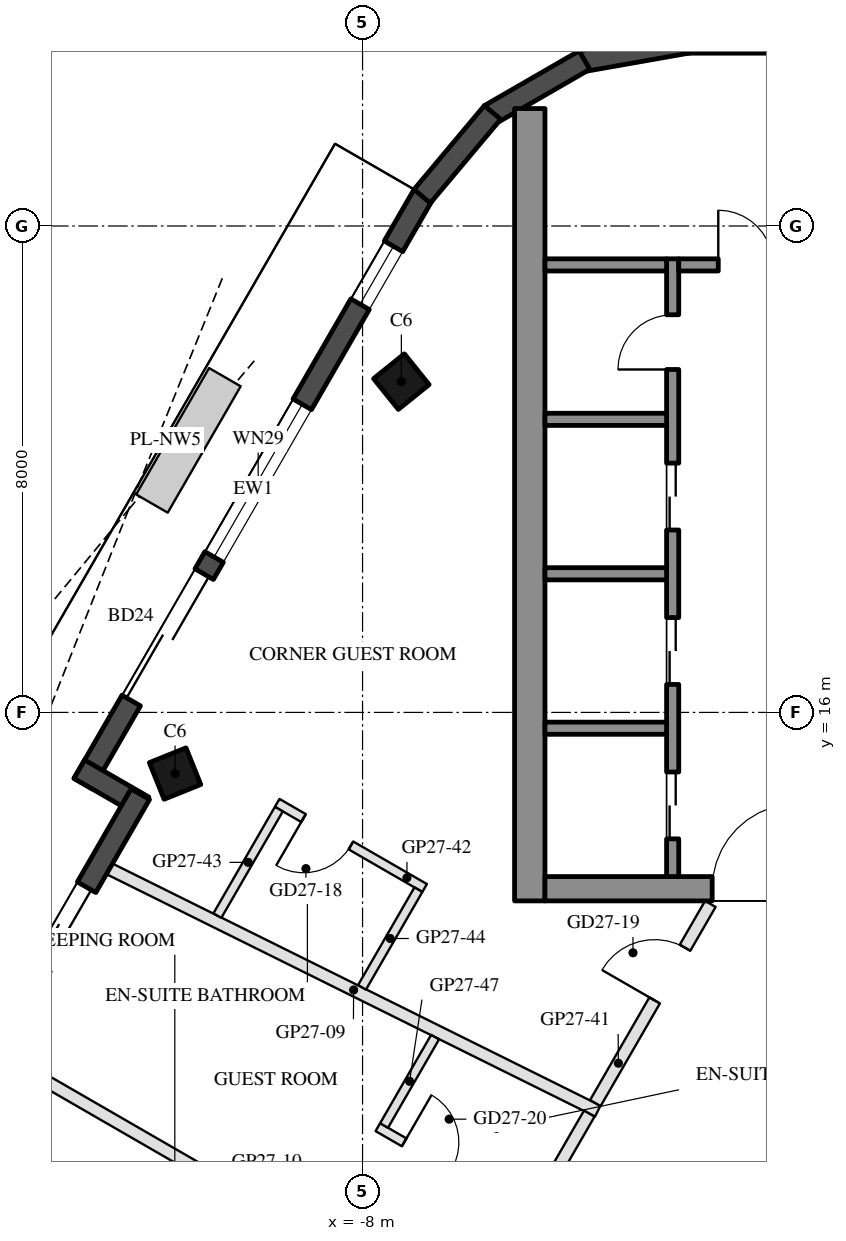
"""IFC4 building model, lengths in metres.
Left out: names, types, materials, properties, quantities, classifications, styles, units other than length and angle.
Written with IfcOpenShell. Run it as: python <this file> out.ifc"""

import sys

from ifc_helpers import new_model, si_unit, direction, frame, frame_2d, origin, origin_2d, place, context, subcontext, project, spatial, rectangle, hollow_rectangle, extrude, boolean, halfspace, element, fill, save


model = new_model("IFC4")
c1 = context("Model", 3, precision=1e-05, world=origin(), true_north=direction((0.0, 1.0)))
c2 = subcontext(c1, "Body", "Model", "MODEL_VIEW")
j1 = project(units=[si_unit("LENGTHUNIT", "METRE"), si_unit("PLANEANGLEUNIT", "RADIAN")], contexts=[c1])
p1 = place(None, origin())
s1 = spatial("IfcSite", under=j1, at=p1, CompositionType="ELEMENT")
p2 = place(p1, origin())
s2 = spatial("IfcBuilding", under=s1, at=p2, CompositionType="ELEMENT")
p3 = place(p2, frame((0.0, 0.0, 276.3)))
s3 = spatial("IfcBuildingStorey", under=s2, at=p3, CompositionType="ELEMENT", Elevation=276.3)
p4 = place(p3, frame((-7.362, 21.44, 0.0), z_axis=(0.06966478086, -0.179988931962, 0.981198656073), x_axis=(0.504437272402, 0.854926536661, 0.121010971086)))
e1 = element("IfcColumn", 1, at=p4, inside=s3, PredefinedType="COLUMN", context=c2, shape_type="SweptSolid", body=[
    boolean("DIFFERENCE", boolean("DIFFERENCE", extrude(hollow_rectangle(XDim=0.65, YDim=0.65, WallThickness=0.03, at=origin_2d()), origin(), (0.0, 0.0, 1.0), 3.771), halfspace(frame((0.0, 0.0, 0.047), z_axis=(0.0, 0.0, 1.0), x_axis=(1.0, 0.0, 0.0)), True)), halfspace(frame((0.0, 0.0, 3.724), z_axis=(0.0, 0.0, 1.0), x_axis=(1.0, 0.0, 0.0)), False)),
])
p5 = place(p3, frame((-11.083, 14.994, 0.0), z_axis=(0.100518021011, -0.128316722417, 0.98662604172), x_axis=(0.503129383785, 0.862065632243, 0.060857775822)))
e2 = element("IfcColumn", 2, at=p5, inside=s3, PredefinedType="COLUMN", context=c2, shape_type="SweptSolid", body=[
    boolean("DIFFERENCE", boolean("DIFFERENCE", extrude(hollow_rectangle(XDim=0.65, YDim=0.65, WallThickness=0.03, at=origin_2d()), origin(), (0.0, 0.0, 1.0), 3.75), halfspace(frame((0.0, 0.0, 0.04), z_axis=(0.0, 0.0, 1.0), x_axis=(1.0, 0.0, 0.0)), True)), halfspace(frame((0.0, 0.0, 3.71), z_axis=(0.0, 0.0, 1.0), x_axis=(1.0, 0.0, 0.0)), False)),
])
p6 = place(p3, frame((-7.002, 24.514, 0.0), z_axis=(0.0, 0.0, 1.0), x_axis=(-0.500000830309, -0.866024924405, 0.0)))
e3 = element("IfcWall", 3, at=p6, inside=s3, PredefinedType="SOLIDWALL", context=c2, shape_type="SweptSolid", body=[
    extrude(rectangle(XDim=11.185, YDim=0.35, at=frame_2d((5.593, 0.0))), origin(), (0.0, 0.0, 1.0), 3.55),
])
p7 = place(p6, frame((0.979, 0.0, 0.3)))
e4 = element("IfcOpeningElement", 4, at=p7, cuts=e3, PredefinedType="OPENING", context=c2, shape_type="SweptSolid", body=[
    extrude(rectangle(XDim=1.1, YDim=2.65, at=frame_2d((0.55, 1.325))), frame((0.0, 0.185, 0.0), z_axis=(0.0, -1.0, 0.0), x_axis=(1.0, 0.0, 0.0)), (0.0, 0.0, 1.0), 0.37),
])
p8 = place(p6, frame((7.205, 0.0, 0.0)))
e5 = element("IfcOpeningElement", 5, at=p8, cuts=e3, PredefinedType="OPENING", context=c2, shape_type="SweptSolid", body=[
    extrude(rectangle(XDim=2.4, YDim=2.4, at=frame_2d((1.2, 1.2))), frame((0.0, 0.185, 0.0), z_axis=(0.0, -1.0, 0.0), x_axis=(1.0, 0.0, 0.0)), (0.0, 0.0, 1.0), 0.37),
])
p9 = place(p6, frame((3.979, 0.0, 0.3)))
e6 = element("IfcOpeningElement", 6, at=p9, cuts=e3, PredefinedType="OPENING", context=c2, shape_type="SweptSolid", body=[
    extrude(rectangle(XDim=2.9, YDim=2.65, at=frame_2d((1.45, 1.325))), frame((0.0, 0.185, 0.0), z_axis=(0.0, -1.0, 0.0), x_axis=(1.0, 0.0, 0.0)), (0.0, 0.0, 1.0), 0.37),
])
p10 = place(p3, frame((-12.659, 15.066, 0.0), z_axis=(0.0, 0.0, 1.0), x_axis=(0.866005645448, -0.500034220881, 0.0)))
e7 = element("IfcWall", 7, at=p10, inside=s3, PredefinedType="SOLIDWALL", context=c2, shape_type="SweptSolid", body=[
    extrude(rectangle(XDim=1.22, YDim=0.35, at=frame_2d((0.61, 0.0))), origin(), (0.0, 0.0, 1.0), 3.55),
])
p11 = place(p3, frame((-11.655, 14.655, 0.0), z_axis=(0.0, 0.0, 1.0), x_axis=(-0.499995993298, -0.866027717042, 0.0)))
e8 = element("IfcWall", 8, at=p11, inside=s3, PredefinedType="SOLIDWALL", context=c2, shape_type="SweptSolid", body=[
    extrude(rectangle(XDim=6.284, YDim=0.35, at=frame_2d((3.142, 0.0))), origin(), (0.0, 0.0, 1.0), 3.55),
])
p12 = place(p11, frame((1.767, 0.0, 0.0)))
e9 = element("IfcOpeningElement", 9, at=p12, cuts=e8, PredefinedType="OPENING", context=c2, shape_type="SweptSolid", body=[
    extrude(rectangle(XDim=1.5, YDim=2.4, at=frame_2d((0.75, 1.2))), frame((0.0, 0.185, 0.0), z_axis=(0.0, -1.0, 0.0), x_axis=(1.0, 0.0, 0.0)), (0.0, 0.0, 1.0), 0.37),
])
p13 = place(p11, frame((3.566, 0.0, 0.3)))
e10 = element("IfcOpeningElement", 10, at=p13, cuts=e8, PredefinedType="OPENING", context=c2, shape_type="SweptSolid", body=[
    extrude(rectangle(XDim=0.8, YDim=2.65, at=frame_2d((0.4, 1.325))), frame((0.0, 0.185, 0.0), z_axis=(0.0, -1.0, 0.0), x_axis=(1.0, 0.0, 0.0)), (0.0, 0.0, 1.0), 0.37),
])
p14 = place(p3, frame((2.666, 27.018, 0.0), z_axis=(0.0, 0.0, 1.0), x_axis=(-1.0, 0.0, 0.0)))
e11 = element("IfcWall", 11, at=p14, inside=s3, PredefinedType="SOLIDWALL", context=c2, shape_type="SweptSolid", body=[
    extrude(rectangle(XDim=5.331, YDim=0.35, at=frame_2d((2.666, 0.0))), origin(), (0.0, 0.0, 1.0), 3.55),
])
for number, where, z_axis, x_axis in (
    (12, (-2.635, 27.02, 0.0), (0.0, 0.0, 1.0), (-0.985, -0.174, 0.0)),
    (13, (-4.351, 26.729, 0.0), (0.0, 0.0, 1.0), (-0.866, -0.5, 0.0)),
):
    element("IfcWall", number, at=place(p3, frame(where, z_axis=z_axis, x_axis=x_axis)), inside=s3, PredefinedType="SOLIDWALL", context=c2, shape_type="SweptSolid", body=[
        extrude(rectangle(XDim=1.8, YDim=0.35, at=frame_2d((0.9, 0.0))), origin(), (0.0, 0.0, 1.0), 3.55),
    ])
p15 = place(p3, frame((-5.863, 25.868, 0.0), z_axis=(0.0, 0.0, 1.0), x_axis=(-0.642756114672, -0.766070869471, 0.0)))
e14 = element("IfcWall", 14, at=p15, inside=s3, PredefinedType="SOLIDWALL", context=c2, shape_type="SweptSolid", body=[
    extrude(rectangle(XDim=1.8, YDim=0.35, at=frame_2d((0.9, 0.0))), origin(), (0.0, 0.0, 1.0), 3.55),
])
p16 = place(p3, frame((-5.25, 12.9, 0.0), z_axis=(0.0, 0.0, 1.0), x_axis=(0.0, 1.0, 0.0)))
e15 = element("IfcWall", 15, at=p16, inside=s3, PredefinedType="SHEAR", context=c2, shape_type="SweptSolid", body=[
    extrude(rectangle(XDim=13.031, YDim=0.5, at=frame_2d((6.516, 0.0))), origin(), (0.0, 0.0, 1.0), 3.5),
])
p17 = place(p3, frame((5.0, 13.1, 0.0), z_axis=(0.0, 0.0, 1.0), x_axis=(-1.0, 0.0, 0.0)))
e16 = element("IfcWall", 16, at=p17, inside=s3, PredefinedType="SHEAR", context=c2, shape_type="SweptSolid", body=[
    extrude(rectangle(XDim=10.0, YDim=0.4, at=frame_2d((5.0, 0.0))), origin(), (0.0, 0.0, 1.0), 3.5),
])
p18 = place(p17, frame((3.55, 0.0, 0.0)))
e17 = element("IfcOpeningElement", 17, at=p18, cuts=e16, PredefinedType="OPENING", context=c2, shape_type="SweptSolid", body=[
    extrude(rectangle(XDim=1.1, YDim=2.1, at=frame_2d((0.55, 1.05))), frame((0.0, 0.21, 0.0), z_axis=(0.0, -1.0, 0.0), x_axis=(1.0, 0.0, 0.0)), (0.0, 0.0, 1.0), 0.42),
])
p19 = place(p17, frame((5.85, 0.0, 0.0)))
e18 = element("IfcOpeningElement", 18, at=p19, cuts=e16, PredefinedType="OPENING", context=c2, shape_type="SweptSolid", body=[
    extrude(rectangle(XDim=1.4, YDim=2.1, at=frame_2d((0.7, 1.05))), frame((0.0, 0.21, 0.0), z_axis=(0.0, -1.0, 0.0), x_axis=(1.0, 0.0, 0.0)), (0.0, 0.0, 1.0), 0.42),
])
p20 = place(p3, frame((-2.9, 13.3, 0.0), z_axis=(0.0, 0.0, 1.0), x_axis=(0.0, 1.0, 0.0)))
e19 = element("IfcWall", 19, at=p20, inside=s3, PredefinedType="SHEAR", context=c2, shape_type="SweptSolid", body=[
    extrude(rectangle(XDim=10.16, YDim=0.2, at=frame_2d((5.08, 0.0))), origin(), (0.0, 0.0, 1.0), 3.5),
])
p21 = place(p20, frame((0.62, 0.0, 0.0)))
e20 = element("IfcOpeningElement", 20, at=p21, cuts=e19, PredefinedType="OPENING", context=c2, shape_type="SweptSolid", body=[
    extrude(rectangle(XDim=1.1, YDim=2.1, at=frame_2d((0.55, 1.05))), frame((0.0, 0.11, 0.0), z_axis=(0.0, -1.0, 0.0), x_axis=(1.0, 0.0, 0.0)), (0.0, 0.0, 1.0), 0.22),
])
p22 = place(p20, frame((3.16, 0.0, 0.0)))
e21 = element("IfcOpeningElement", 21, at=p22, cuts=e19, PredefinedType="OPENING", context=c2, shape_type="SweptSolid", body=[
    extrude(rectangle(XDim=1.1, YDim=2.1, at=frame_2d((0.55, 1.05))), frame((0.0, 0.11, 0.0), z_axis=(0.0, -1.0, 0.0), x_axis=(1.0, 0.0, 0.0)), (0.0, 0.0, 1.0), 0.22),
])
p23 = place(p20, frame((5.7, 0.0, 0.0)))
e22 = element("IfcOpeningElement", 22, at=p23, cuts=e19, PredefinedType="OPENING", context=c2, shape_type="SweptSolid", body=[
    extrude(rectangle(XDim=1.1, YDim=2.1, at=frame_2d((0.55, 1.05))), frame((0.0, 0.11, 0.0), z_axis=(0.0, -1.0, 0.0), x_axis=(1.0, 0.0, 0.0)), (0.0, 0.0, 1.0), 0.22),
])
p24 = place(p20, frame((8.34, 0.0, 0.0)))
e23 = element("IfcOpeningElement", 23, at=p24, cuts=e19, PredefinedType="OPENING", context=c2, shape_type="SweptSolid", body=[
    extrude(rectangle(XDim=0.9, YDim=2.1, at=frame_2d((0.45, 1.05))), frame((0.0, 0.11, 0.0), z_axis=(0.0, -1.0, 0.0), x_axis=(1.0, 0.0, 0.0)), (0.0, 0.0, 1.0), 0.22),
])
p25 = place(p3, frame((-0.4, 23.36, 0.0), z_axis=(0.0, 0.0, 1.0), x_axis=(-1.0, 0.0, 0.0)))
e24 = element("IfcWall", 24, at=p25, inside=s3, PredefinedType="SHEAR", context=c2, shape_type="SweptSolid", body=[
    extrude(rectangle(XDim=2.4, YDim=0.2, at=frame_2d((1.2, 0.0))), origin(), (0.0, 0.0, 1.0), 3.5),
])
p26 = place(p25, frame((0.85, 0.0, 0.0)))
e25 = element("IfcOpeningElement", 25, at=p26, cuts=e24, PredefinedType="OPENING", context=c2, shape_type="SweptSolid", body=[
    extrude(rectangle(XDim=0.9, YDim=2.1, at=frame_2d((0.45, 1.05))), frame((0.0, 0.11, 0.0), z_axis=(0.0, -1.0, 0.0), x_axis=(1.0, 0.0, 0.0)), (0.0, 0.0, 1.0), 0.22),
])
for number, where, z_axis, x_axis in (
    (26, (-3.0, 15.74, 0.0), (0.0, 0.0, 1.0), (-1.0, 0.0, 0.0)),
    (27, (-3.0, 18.28, 0.0), (0.0, 0.0, 1.0), (-1.0, 0.0, 0.0)),
    (28, (-3.0, 20.82, 0.0), (0.0, 0.0, 1.0), (-1.0, 0.0, 0.0)),
    (29, (-3.0, 23.36, 0.0), (0.0, 0.0, 1.0), (-1.0, 0.0, 0.0)),
):
    element("IfcWall", number, at=place(p3, frame(where, z_axis=z_axis, x_axis=x_axis)), inside=s3, PredefinedType="SHEAR", context=c2, shape_type="SweptSolid", body=[
        extrude(rectangle(XDim=2.0, YDim=0.2, at=frame_2d((1.0, 0.0))), origin(), (0.0, 0.0, 1.0), 3.5),
    ])
p27 = place(p3, frame((-12.162, 13.427, 0.0), z_axis=(0.0, 0.0, 1.0), x_axis=(0.895849808174, -0.444356974959, 0.0)))
e30 = element("IfcWall", 30, at=p27, inside=s3, PredefinedType="PARTITIONING", context=c2, shape_type="SweptSolid", body=[
    extrude(rectangle(XDim=8.964, YDim=0.2, at=frame_2d((4.482, 0.0))), origin(), (0.0, 0.0, 1.0), 3.1),
])
p28 = place(p3, frame((-13.935, 10.355, 0.0), z_axis=(0.0, 0.0, 1.0), x_axis=(0.866026066645, -0.499998851889, 0.0)))
e31 = element("IfcWall", 31, at=p28, inside=s3, PredefinedType="PARTITIONING", context=c2, shape_type="SweptSolid", body=[
    extrude(rectangle(XDim=8.946, YDim=0.2, at=frame_2d((4.473, 0.0))), origin(), (0.0, 0.0, 1.0), 3.1),
])
p29 = place(p3, frame((-4.171, 9.575, 0.0), z_axis=(0.0, 0.0, 1.0), x_axis=(0.49999255039, 0.866029704776, 0.0)))
e32 = element("IfcWall", 32, at=p29, inside=s3, PredefinedType="PARTITIONING", context=c2, shape_type="SweptSolid", body=[
    extrude(rectangle(XDim=3.782, YDim=0.2, at=frame_2d((1.891, 0.0))), origin(), (0.0, 0.0, 1.0), 3.05),
])
p30 = place(p29, frame((1.95, 0.0, 0.0)))
e33 = element("IfcOpeningElement", 33, at=p30, cuts=e32, PredefinedType="OPENING", context=c2, shape_type="SweptSolid", body=[
    extrude(rectangle(XDim=1.0, YDim=2.1, at=frame_2d((0.5, 1.05))), frame((0.0, 0.11, 0.0), z_axis=(0.0, -1.0, 0.0), x_axis=(1.0, 0.0, 0.0)), (0.0, 0.0, 1.0), 0.22),
])
p31 = place(p3, frame((-6.979, 13.112, 0.0), z_axis=(0.0, 0.0, 1.0), x_axis=(-0.865996816683, 0.500049511043, 0.0)))
e34 = element("IfcWall", 34, at=p31, inside=s3, PredefinedType="PARTITIONING", context=c2, shape_type="SweptSolid", body=[
    extrude(rectangle(XDim=2.8, YDim=0.15, at=frame_2d((1.4, 0.0))), origin(), (0.0, 0.0, 1.0), 3.55),
])
p32 = place(p31, frame((1.4, 0.0, 0.0)))
e35 = element("IfcOpeningElement", 35, at=p32, cuts=e34, PredefinedType="OPENING", context=c2, shape_type="SweptSolid", body=[
    extrude(rectangle(XDim=0.9, YDim=2.1, at=frame_2d((0.45, 1.05))), frame((0.0, 0.085, 0.0), z_axis=(0.0, -1.0, 0.0), x_axis=(1.0, 0.0, 0.0)), (0.0, 0.0, 1.0), 0.17),
])
p33 = place(p3, frame((-9.376, 14.41, 0.0), z_axis=(0.0, 0.0, 1.0), x_axis=(-0.499917528438, -0.866073013527, 0.0)))
e36 = element("IfcWall", 36, at=p33, inside=s3, PredefinedType="PARTITIONING", context=c2, shape_type="SweptSolid", body=[
    extrude(rectangle(XDim=2.022, YDim=0.15, at=frame_2d((1.011, 0.0))), origin(), (0.0, 0.0, 1.0), 3.05),
])
p34 = place(p3, frame((-7.081, 13.085, 0.0), z_axis=(0.0, 0.0, 1.0), x_axis=(-0.500060473882, -0.865990486357, 0.0)))
e37 = element("IfcWall", 37, at=p34, inside=s3, PredefinedType="PARTITIONING", context=c2, shape_type="SweptSolid", body=[
    extrude(rectangle(XDim=1.855, YDim=0.15, at=frame_2d((0.927, 0.0))), origin(), (0.0, 0.0, 1.0), 3.05),
])
p35 = place(p3, frame((-6.225, 6.019, 0.0), z_axis=(0.0, 0.0, 1.0), x_axis=(0.500011000363, 0.866019052629, 0.0)))
e38 = element("IfcWall", 38, at=p35, inside=s3, PredefinedType="PARTITIONING", context=c2, shape_type="SweptSolid", body=[
    extrude(rectangle(XDim=3.906, YDim=0.2, at=frame_2d((1.953, 0.0))), origin(), (0.0, 0.0, 1.0), 3.05),
])
p36 = place(p35, frame((0.45, 0.0, 0.0)))
e39 = element("IfcOpeningElement", 39, at=p36, cuts=e38, PredefinedType="OPENING", context=c2, shape_type="SweptSolid", body=[
    extrude(rectangle(XDim=1.0, YDim=2.1, at=frame_2d((0.5, 1.05))), frame((0.0, 0.11, 0.0), z_axis=(0.0, -1.0, 0.0), x_axis=(1.0, 0.0, 0.0)), (0.0, 0.0, 1.0), 0.22),
])
p37 = place(p3, frame((-7.749, 9.179, 0.0), z_axis=(0.0, 0.0, 1.0), x_axis=(0.866018616679, -0.500011755427, 0.0)))
e40 = element("IfcWall", 40, at=p37, inside=s3, PredefinedType="PARTITIONING", context=c2, shape_type="SweptSolid", body=[
    extrude(rectangle(XDim=2.8, YDim=0.15, at=frame_2d((1.4, 0.0))), origin(), (0.0, 0.0, 1.0), 3.55),
])
p38 = place(p37, frame((0.5, 0.0, 0.0)))
e41 = element("IfcOpeningElement", 41, at=p38, cuts=e40, PredefinedType="OPENING", context=c2, shape_type="SweptSolid", body=[
    extrude(rectangle(XDim=0.9, YDim=2.1, at=frame_2d((0.45, 1.05))), frame((0.0, 0.085, 0.0), z_axis=(0.0, -1.0, 0.0), x_axis=(1.0, 0.0, 0.0)), (0.0, 0.0, 1.0), 0.17),
])
p39 = place(p3, frame((-6.807, 10.659, 0.0), z_axis=(0.0, 0.0, 1.0), x_axis=(-0.500020578564, -0.866013522419, 0.0)))
e42 = element("IfcWall", 42, at=p39, inside=s3, PredefinedType="PARTITIONING", context=c2, shape_type="SweptSolid", body=[
    extrude(rectangle(XDim=1.678, YDim=0.15, at=frame_2d((0.839, 0.0))), origin(), (0.0, 0.0, 1.0), 3.55),
])
p40 = place(p7, origin())
e43 = element("IfcWindow", 43, at=p40, inside=s3, PartitioningType="SINGLE_PANEL", PredefinedType="WINDOW", context=c2, shape_type="SweptSolid", body=[
    extrude(rectangle(XDim=1.1, YDim=2.65, at=frame_2d((0.55, 1.325))), frame((0.0, 0.03, 0.0), z_axis=(0.0, -1.0, 0.0), x_axis=(1.0, 0.0, 0.0)), (0.0, 0.0, 1.0), 0.06),
])
fill(e4, e43)
p41 = place(p8, frame((2.4, 0.0, 0.0), z_axis=(0.0, 0.0, 1.0), x_axis=(-1.0, 0.0, 0.0)))
e44 = element("IfcDoor", 44, at=p41, inside=s3, OperationType="SLIDING_TO_LEFT", PredefinedType="DOOR", context=c2, shape_type="SweptSolid", body=[
    extrude(rectangle(XDim=2.4, YDim=2.4, at=frame_2d((1.2, 1.2))), frame((0.0, 0.025, 0.0), z_axis=(0.0, -1.0, 0.0), x_axis=(1.0, 0.0, 0.0)), (0.0, 0.0, 1.0), 0.05),
])
fill(e5, e44)
p42 = place(p9, origin())
e45 = element("IfcWindow", 45, at=p42, inside=s3, PartitioningType="SINGLE_PANEL", PredefinedType="WINDOW", context=c2, shape_type="SweptSolid", body=[
    extrude(rectangle(XDim=2.9, YDim=2.65, at=frame_2d((1.45, 1.325))), frame((0.0, 0.03, 0.0), z_axis=(0.0, -1.0, 0.0), x_axis=(1.0, 0.0, 0.0)), (0.0, 0.0, 1.0), 0.06),
])
fill(e6, e45)
p43 = place(p12, frame((1.5, 0.0, 0.0), z_axis=(0.0, 0.0, 1.0), x_axis=(-1.0, 0.0, 0.0)))
e46 = element("IfcDoor", 46, at=p43, inside=s3, OperationType="SLIDING_TO_LEFT", PredefinedType="DOOR", context=c2, shape_type="SweptSolid", body=[
    extrude(rectangle(XDim=1.5, YDim=2.4, at=frame_2d((0.75, 1.2))), frame((0.0, 0.025, 0.0), z_axis=(0.0, -1.0, 0.0), x_axis=(1.0, 0.0, 0.0)), (0.0, 0.0, 1.0), 0.05),
])
fill(e9, e46)
p44 = place(p21, origin())
e47 = element("IfcDoor", 47, at=p44, inside=s3, OperationType="DOUBLE_DOOR_SLIDING", PredefinedType="DOOR", context=c2, shape_type="SweptSolid", body=[
    extrude(rectangle(XDim=1.1, YDim=2.1, at=frame_2d((0.55, 1.05))), frame((0.0, 0.025, 0.0), z_axis=(0.0, -1.0, 0.0), x_axis=(1.0, 0.0, 0.0)), (0.0, 0.0, 1.0), 0.05),
])
fill(e20, e47)
p45 = place(p22, origin())
e48 = element("IfcDoor", 48, at=p45, inside=s3, OperationType="DOUBLE_DOOR_SLIDING", PredefinedType="DOOR", context=c2, shape_type="SweptSolid", body=[
    extrude(rectangle(XDim=1.1, YDim=2.1, at=frame_2d((0.55, 1.05))), frame((0.0, 0.025, 0.0), z_axis=(0.0, -1.0, 0.0), x_axis=(1.0, 0.0, 0.0)), (0.0, 0.0, 1.0), 0.05),
])
fill(e21, e48)
p46 = place(p23, origin())
e49 = element("IfcDoor", 49, at=p46, inside=s3, OperationType="DOUBLE_DOOR_SLIDING", PredefinedType="DOOR", context=c2, shape_type="SweptSolid", body=[
    extrude(rectangle(XDim=1.1, YDim=2.1, at=frame_2d((0.55, 1.05))), frame((0.0, 0.025, 0.0), z_axis=(0.0, -1.0, 0.0), x_axis=(1.0, 0.0, 0.0)), (0.0, 0.0, 1.0), 0.05),
])
fill(e22, e49)
p47 = place(p24, origin())
e50 = element("IfcDoor", 50, at=p47, inside=s3, OperationType="SINGLE_SWING_LEFT", PredefinedType="DOOR", context=c2, shape_type="SweptSolid", body=[
    extrude(rectangle(XDim=0.9, YDim=2.1, at=frame_2d((0.45, 1.05))), frame((0.0, 0.025, 0.0), z_axis=(0.0, -1.0, 0.0), x_axis=(1.0, 0.0, 0.0)), (0.0, 0.0, 1.0), 0.05),
])
fill(e23, e50)
p48 = place(p26, frame((0.9, 0.0, 0.0), z_axis=(0.0, 0.0, 1.0), x_axis=(-1.0, 0.0, 0.0)))
e51 = element("IfcDoor", 51, at=p48, inside=s3, OperationType="SINGLE_SWING_LEFT", PredefinedType="DOOR", context=c2, shape_type="SweptSolid", body=[
    extrude(rectangle(XDim=0.9, YDim=2.1, at=frame_2d((0.45, 1.05))), frame((0.0, 0.025, 0.0), z_axis=(0.0, -1.0, 0.0), x_axis=(1.0, 0.0, 0.0)), (0.0, 0.0, 1.0), 0.05),
])
fill(e25, e51)
p49 = place(p19, frame((1.4, 0.0, 0.0), z_axis=(0.0, 0.0, 1.0), x_axis=(-1.0, 0.0, 0.0)))
e52 = element("IfcDoor", 52, at=p49, inside=s3, OperationType="DOUBLE_DOOR_SINGLE_SWING", PredefinedType="DOOR", context=c2, shape_type="SweptSolid", body=[
    extrude(rectangle(XDim=1.4, YDim=2.1, at=frame_2d((0.7, 1.05))), frame((0.0, 0.025, 0.0), z_axis=(0.0, -1.0, 0.0), x_axis=(1.0, 0.0, 0.0)), (0.0, 0.0, 1.0), 0.05),
])
fill(e18, e52)
p50 = place(p32, origin())
e53 = element("IfcDoor", 53, at=p50, inside=s3, OperationType="SINGLE_SWING_RIGHT", PredefinedType="DOOR", context=c2, shape_type="SweptSolid", body=[
    extrude(rectangle(XDim=0.9, YDim=2.1, at=frame_2d((0.45, 1.05))), frame((0.0, 0.025, 0.0), z_axis=(0.0, -1.0, 0.0), x_axis=(1.0, 0.0, 0.0)), (0.0, 0.0, 1.0), 0.05),
])
fill(e35, e53)
p51 = place(p30, origin())
e54 = element("IfcDoor", 54, at=p51, inside=s3, OperationType="SINGLE_SWING_LEFT", PredefinedType="DOOR", context=c2, shape_type="SweptSolid", body=[
    extrude(rectangle(XDim=1.0, YDim=2.1, at=frame_2d((0.5, 1.05))), frame((0.0, 0.025, 0.0), z_axis=(0.0, -1.0, 0.0), x_axis=(1.0, 0.0, 0.0)), (0.0, 0.0, 1.0), 0.05),
])
fill(e33, e54)
p52 = place(p38, origin())
e55 = element("IfcDoor", 55, at=p52, inside=s3, OperationType="SINGLE_SWING_LEFT", PredefinedType="DOOR", context=c2, shape_type="SweptSolid", body=[
    extrude(rectangle(XDim=0.9, YDim=2.1, at=frame_2d((0.45, 1.05))), frame((0.0, 0.025, 0.0), z_axis=(0.0, -1.0, 0.0), x_axis=(1.0, 0.0, 0.0)), (0.0, 0.0, 1.0), 0.05),
])
fill(e41, e55)
save(model, sys.argv[1])
